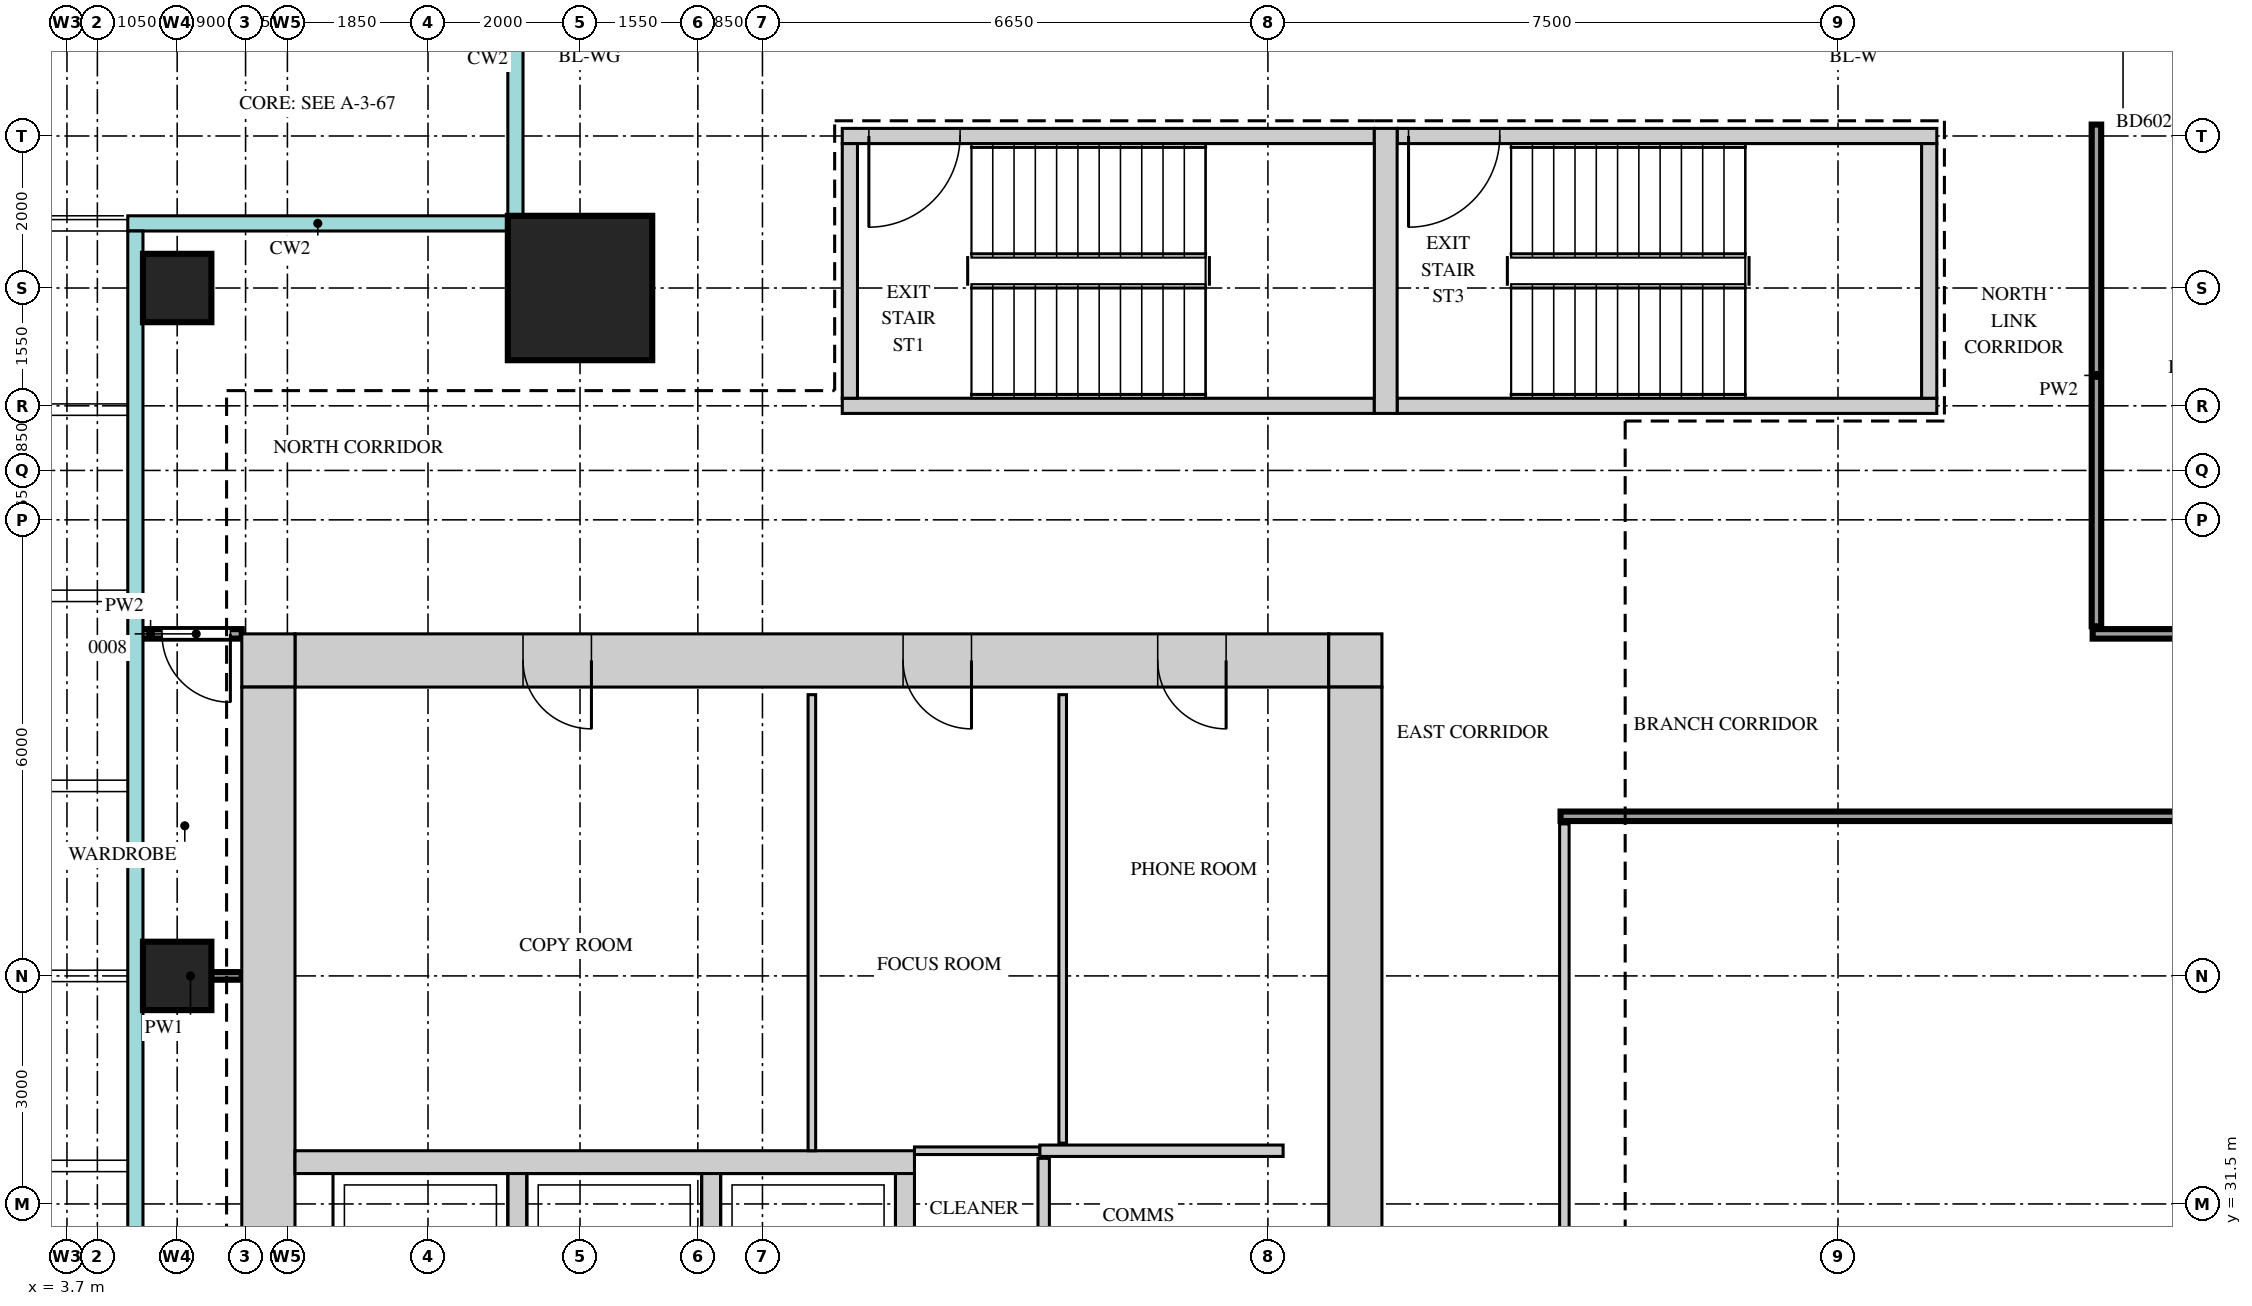
"""IFC4 building model, lengths in metres.
Left out: names, types, materials, properties, quantities, classifications, styles, units other than length and angle.
Written with IfcOpenShell. Run it as: python <this file> out.ifc"""

import sys

from ifc_helpers import new_model, si_unit, direction, frame, frame_2d, origin, origin_2d, place, context, subcontext, project, spatial, rectangle, extrude, source, transform, mapped, element, fill, save


model = new_model("IFC4")
c1 = context("Model", 3, precision=1e-05, world=origin(), true_north=direction((0.0, 1.0)))
c2 = subcontext(c1, "Body", "Model", "MODEL_VIEW")
j1 = project(units=[si_unit("LENGTHUNIT", "METRE"), si_unit("PLANEANGLEUNIT", "RADIAN")], contexts=[c1])
p1 = place(None, origin())
s1 = spatial("IfcSite", under=j1, at=p1, CompositionType="ELEMENT")
p2 = place(p1, origin())
s2 = spatial("IfcBuilding", under=s1, at=p2, CompositionType="ELEMENT")
p3 = place(p2, frame((0.0, 0.0, 266.2)))
s3 = spatial("IfcBuildingStorey", under=s2, at=p3, CompositionType="ELEMENT", Elevation=266.2)
m1 = source(origin(), c2, "Body", "SweptSolid", [
    extrude(rectangle(XDim=13.6, YDim=0.7, at=frame_2d((6.8, 0.0))), origin(), (0.0, 0.0, 1.0), 3.75),
])
p4 = place(p3, frame((6.7, 38.65, 0.0), z_axis=(0.0, 0.0, 1.0), x_axis=(1.0, 0.0, 0.0)))
e1 = element("IfcWall", 1, at=p4, inside=s3, PredefinedType="SHEAR", context=c2, shape_type="MappedRepresentation", body=[
    mapped(m1, transform((0.0, 0.0, 0.0))),
])
m2 = source(origin(), c2, "Body", "SweptSolid", [
    extrude(rectangle(XDim=0.9, YDim=2.1, at=frame_2d((0.45, 1.05))), frame((0.0, 0.36, 0.0), z_axis=(0.0, -1.0, 0.0), x_axis=(1.0, 0.0, 0.0)), (0.0, 0.0, 1.0), 0.72),
])
p5 = place(p4, frame((3.0, 0.0, 0.0)))
e2 = element("IfcOpeningElement", 2, at=p5, cuts=e1, PredefinedType="OPENING", context=c2, shape_type="MappedRepresentation", body=[
    mapped(m2, transform((0.0, 0.0, 0.0))),
])
p6 = place(p4, frame((8.0, 0.0, 0.0)))
e3 = element("IfcOpeningElement", 3, at=p6, cuts=e1, PredefinedType="OPENING", context=c2, shape_type="MappedRepresentation", body=[
    mapped(m2, transform((0.0, 0.0, 0.0))),
])
p7 = place(p4, frame((11.35, 0.0, 0.0)))
e4 = element("IfcOpeningElement", 4, at=p7, cuts=e1, PredefinedType="OPENING", context=c2, shape_type="MappedRepresentation", body=[
    mapped(m2, transform((0.0, 0.0, 0.0))),
])
m3 = source(origin(), c2, "Body", "SweptSolid", [
    extrude(rectangle(XDim=0.7, YDim=0.7, at=frame_2d((0.35, 0.0))), origin(), (0.0, 0.0, 1.0), 3.75),
])
for number, where, z_axis, x_axis in (
    (5, (20.3, 38.65, 0.0), (0.0, 0.0, 1.0), (1.0, 0.0, 0.0)),
    (6, (6.0, 38.65, 0.0), (0.0, 0.0, 1.0), (1.0, 0.0, 0.0)),
):
    element("IfcWall", number, at=place(p3, frame(where, z_axis=z_axis, x_axis=x_axis)), inside=s3, PredefinedType="SHEAR", context=c2, shape_type="MappedRepresentation", body=[
        mapped(m3, transform((0.0, 0.0, 0.0))),
    ])
m4 = source(origin(), c2, "Body", "SweptSolid", [
    extrude(rectangle(XDim=22.6, YDim=0.7, at=frame_2d((11.3, 0.0))), origin(), (0.0, 0.0, 1.0), 3.75),
])
p8 = place(p3, frame((20.65, 15.7, 0.0), z_axis=(0.0, 0.0, 1.0), x_axis=(0.0, 1.0, 0.0)))
e7 = element("IfcWall", 7, at=p8, inside=s3, PredefinedType="SHEAR", context=c2, shape_type="MappedRepresentation", body=[
    mapped(m4, transform((0.0, 0.0, 0.0))),
])
m5 = source(origin(), c2, "Body", "SweptSolid", [
    extrude(rectangle(XDim=1.8, YDim=2.1, at=frame_2d((0.9, 1.05))), frame((0.0, 0.36, 0.0), z_axis=(0.0, -1.0, 0.0), x_axis=(1.0, 0.0, 0.0)), (0.0, 0.0, 1.0), 0.72),
])
p9 = place(p8, frame((10.8, 0.0, 0.0)))
e8 = element("IfcOpeningElement", 8, at=p9, cuts=e7, PredefinedType="OPENING", context=c2, shape_type="MappedRepresentation", body=[
    mapped(m5, transform((0.0, 0.0, 0.0))),
])
p10 = place(p8, frame((0.45, 0.0, 0.0)))
e9 = element("IfcOpeningElement", 9, at=p10, cuts=e7, PredefinedType="OPENING", context=c2, shape_type="MappedRepresentation", body=[
    mapped(m2, transform((0.0, 0.0, 0.0))),
])
p11 = place(p8, frame((4.0, 0.0, 0.0)))
e10 = element("IfcOpeningElement", 10, at=p11, cuts=e7, PredefinedType="OPENING", context=c2, shape_type="MappedRepresentation", body=[
    mapped(m2, transform((0.0, 0.0, 0.0))),
])
p12 = place(p3, frame((6.35, 15.7, 0.0), z_axis=(0.0, 0.0, 1.0), x_axis=(0.0, 1.0, 0.0)))
e11 = element("IfcWall", 11, at=p12, inside=s3, PredefinedType="SHEAR", context=c2, shape_type="MappedRepresentation", body=[
    mapped(m4, transform((0.0, 0.0, 0.0))),
])
m6 = source(origin(), c2, "Body", "SweptSolid", [
    extrude(rectangle(XDim=7.0, YDim=0.2, at=frame_2d((3.5, 0.0))), origin(), (0.0, 0.0, 1.0), 3.75),
])
p13 = place(p3, frame((13.9, 45.55, 0.0), z_axis=(0.0, 0.0, 1.0), x_axis=(1.0, 0.0, 0.0)))
e12 = element("IfcWall", 12, at=p13, inside=s3, PredefinedType="SHEAR", context=c2, shape_type="MappedRepresentation", body=[
    mapped(m6, transform((0.0, 0.0, 0.0))),
])
m7 = source(origin(), c2, "Body", "SweptSolid", [
    extrude(rectangle(XDim=1.2, YDim=2.1, at=frame_2d((0.6, 1.05))), frame((0.0, 0.11, 0.0), z_axis=(0.0, -1.0, 0.0), x_axis=(1.0, 0.0, 0.0)), (0.0, 0.0, 1.0), 0.22),
])
p14 = place(p13, frame((0.35, 0.0, 0.0)))
e13 = element("IfcOpeningElement", 13, at=p14, cuts=e12, PredefinedType="OPENING", context=c2, shape_type="MappedRepresentation", body=[
    mapped(m7, transform((0.0, 0.0, 0.0))),
])
p15 = place(p3, frame((13.9, 42.0, 0.0), z_axis=(0.0, 0.0, 1.0), x_axis=(1.0, 0.0, 0.0)))
e14 = element("IfcWall", 14, at=p15, inside=s3, PredefinedType="SHEAR", context=c2, shape_type="MappedRepresentation", body=[
    mapped(m6, transform((0.0, 0.0, 0.0))),
])
m8 = source(origin(), c2, "Body", "SweptSolid", [
    extrude(rectangle(XDim=7.1, YDim=0.2, at=frame_2d((3.55, 0.0))), origin(), (0.0, 0.0, 1.0), 3.75),
])
p16 = place(p3, frame((21.2, 45.55, 0.0), z_axis=(0.0, 0.0, 1.0), x_axis=(1.0, 0.0, 0.0)))
e15 = element("IfcWall", 15, at=p16, inside=s3, PredefinedType="SHEAR", context=c2, shape_type="MappedRepresentation", body=[
    mapped(m8, transform((0.0, 0.0, 0.0))),
])
p17 = place(p16, frame((0.15, 0.0, 0.0)))
e16 = element("IfcOpeningElement", 16, at=p17, cuts=e15, PredefinedType="OPENING", context=c2, shape_type="MappedRepresentation", body=[
    mapped(m7, transform((0.0, 0.0, 0.0))),
])
p18 = place(p3, frame((21.2, 42.0, 0.0), z_axis=(0.0, 0.0, 1.0), x_axis=(1.0, 0.0, 0.0)))
e17 = element("IfcWall", 17, at=p18, inside=s3, PredefinedType="SHEAR", context=c2, shape_type="MappedRepresentation", body=[
    mapped(m8, transform((0.0, 0.0, 0.0))),
])
m9 = source(origin(), c2, "Body", "SweptSolid", [
    extrude(rectangle(XDim=3.75, YDim=0.3, at=frame_2d((1.875, 0.0))), origin(), (0.0, 0.0, 1.0), 3.75),
])
p19 = place(p3, frame((21.05, 41.9, 0.0), z_axis=(0.0, 0.0, 1.0), x_axis=(0.0, 1.0, 0.0)))
e18 = element("IfcWall", 18, at=p19, inside=s3, PredefinedType="SHEAR", context=c2, shape_type="MappedRepresentation", body=[
    mapped(m9, transform((0.0, 0.0, 0.0))),
])
m10 = source(origin(), c2, "Body", "SweptSolid", [
    extrude(rectangle(XDim=3.35, YDim=0.2, at=frame_2d((1.675, 0.0))), origin(), (0.0, 0.0, 1.0), 3.75),
])
for number, where, z_axis, x_axis in (
    (19, (14.0, 42.1, 0.0), (0.0, 0.0, 1.0), (0.0, 1.0, 0.0)),
    (20, (28.2, 42.1, 0.0), (0.0, 0.0, 1.0), (0.0, 1.0, 0.0)),
):
    element("IfcWall", number, at=place(p3, frame(where, z_axis=z_axis, x_axis=x_axis)), inside=s3, PredefinedType="SHEAR", context=c2, shape_type="MappedRepresentation", body=[
        mapped(m10, transform((0.0, 0.0, 0.0))),
    ])
m11 = source(origin(), c2, "Body", "SweptSolid", [
    extrude(rectangle(XDim=8.15, YDim=0.3, at=frame_2d((4.075, 0.0))), origin(), (0.0, 0.0, 1.0), 3.75),
])
p20 = place(p3, frame((6.7, 32.05, 0.0), z_axis=(0.0, 0.0, 1.0), x_axis=(1.0, 0.0, 0.0)))
e21 = element("IfcWall", 21, at=p20, inside=s3, PredefinedType="STANDARD", context=c2, shape_type="MappedRepresentation", body=[
    mapped(m11, transform((0.0, 0.0, 0.0))),
])
m12 = source(origin(), c2, "Body", "SweptSolid", [
    extrude(rectangle(XDim=2.4, YDim=0.25, at=frame_2d((1.2, 0.0))), origin(), (0.0, 0.0, 1.0), 3.75),
])
for number, where, z_axis, x_axis in (
    (22, (9.625, 29.5, 0.0), (0.0, 0.0, 1.0), (0.0, 1.0, 0.0)),
    (23, (12.175, 29.5, 0.0), (0.0, 0.0, 1.0), (0.0, 1.0, 0.0)),
    (24, (14.725, 29.5, 0.0), (0.0, 0.0, 1.0), (0.0, 1.0, 0.0)),
):
    element("IfcWall", number, at=place(p3, frame(where, z_axis=z_axis, x_axis=x_axis)), inside=s3, PredefinedType="STANDARD", context=c2, shape_type="MappedRepresentation", body=[
        mapped(m12, transform((0.0, 0.0, 0.0))),
    ])
m13 = source(origin(), c2, "Body", "SweptSolid", [
    extrude(rectangle(XDim=1.9, YDim=1.9, at=origin_2d()), origin(), (0.0, 0.0, 1.0), 4.0),
])
p21 = place(p3, frame((10.45, 43.55, 0.0), z_axis=(0.0, 0.0, 1.0), x_axis=(1.0, 0.0, 0.0)))
e25 = element("IfcColumn", 25, at=p21, inside=s3, PredefinedType="COLUMN", context=c2, shape_type="MappedRepresentation", body=[
    mapped(m13, transform((0.0, 0.0, 0.0))),
])
m14 = source(origin(), c2, "Body", "SweptSolid", [
    extrude(rectangle(XDim=0.9, YDim=0.9, at=origin_2d()), origin(), (0.0, 0.0, 1.0), 3.75),
])
for number, where, z_axis, x_axis in (
    (26, (5.15, 34.5, 0.0), (0.0, 0.0, 1.0), (1.0, 0.0, 0.0)),
    (27, (5.15, 43.55, 0.0), (0.0, 0.0, 1.0), (1.0, 0.0, 0.0)),
):
    element("IfcColumn", number, at=place(p3, frame(where, z_axis=z_axis, x_axis=x_axis)), inside=s3, PredefinedType="COLUMN", context=c2, shape_type="MappedRepresentation", body=[
        mapped(m14, transform((0.0, 0.0, 0.0))),
    ])
m15 = source(origin(), c2, "Body", "SweptSolid", [
    extrude(rectangle(XDim=18.4, YDim=0.125, at=frame_2d((9.2, 0.0))), origin(), (0.0, 0.0, 1.0), 3.8),
])
p22 = place(p3, frame((23.4, 18.1, 0.0), z_axis=(0.0, 0.0, 1.0), x_axis=(0.0, 1.0, 0.0)))
e28 = element("IfcWall", 28, at=p22, inside=s3, PredefinedType="PARTITIONING", context=c2, shape_type="MappedRepresentation", body=[
    mapped(m15, transform((0.0, 0.0, 0.0))),
])
m16 = source(origin(), c2, "Body", "SweptSolid", [
    extrude(rectangle(XDim=1.2, YDim=2.1, at=frame_2d((0.6, 1.05))), frame((0.0, 0.073, 0.0), z_axis=(0.0, -1.0, 0.0), x_axis=(1.0, 0.0, 0.0)), (0.0, 0.0, 1.0), 0.145),
])
p23 = place(p22, frame((8.6, 0.0, 0.0)))
e29 = element("IfcOpeningElement", 29, at=p23, cuts=e28, PredefinedType="OPENING", context=c2, shape_type="MappedRepresentation", body=[
    mapped(m16, transform((0.0, 0.0, 0.0))),
])
m17 = source(origin(), c2, "Body", "SweptSolid", [
    extrude(rectangle(XDim=2.8, YDim=0.15, at=frame_2d((1.4, 0.0))), origin(), (0.0, 0.0, 1.0), 3.8),
])
p24 = place(p3, frame((16.55, 29.3, 0.0), z_axis=(0.0, 0.0, 1.0), x_axis=(0.0, 1.0, 0.0)))
e30 = element("IfcWall", 30, at=p24, inside=s3, PredefinedType="PARTITIONING", context=c2, shape_type="MappedRepresentation", body=[
    mapped(m17, transform((0.0, 0.0, 0.0))),
])
m18 = source(origin(), c2, "Body", "SweptSolid", [
    extrude(rectangle(XDim=6.0, YDim=0.1, at=frame_2d((3.0, 0.0))), origin(), (0.0, 0.0, 1.0), 3.8),
])
p25 = place(p3, frame((13.5, 32.2, 0.0), z_axis=(0.0, 0.0, 1.0), x_axis=(0.0, 1.0, 0.0)))
e31 = element("IfcWall", 31, at=p25, inside=s3, PredefinedType="PARTITIONING", context=c2, shape_type="MappedRepresentation", body=[
    mapped(m18, transform((0.0, 0.0, 0.0))),
])
m19 = source(origin(), c2, "Body", "SweptSolid", [
    extrude(rectangle(XDim=1.65, YDim=0.1, at=frame_2d((0.825, 0.0))), origin(), (0.0, 0.0, 1.0), 3.8),
])
p26 = place(p3, frame((14.85, 32.2, 0.0), z_axis=(0.0, 0.0, 1.0), x_axis=(1.0, 0.0, 0.0)))
e32 = element("IfcWall", 32, at=p26, inside=s3, PredefinedType="PARTITIONING", context=c2, shape_type="MappedRepresentation", body=[
    mapped(m19, transform((0.0, 0.0, 0.0))),
])
m20 = source(origin(), c2, "Body", "SweptSolid", [
    extrude(rectangle(XDim=3.2, YDim=0.15, at=frame_2d((1.6, 0.0))), origin(), (0.0, 0.0, 1.0), 3.8),
])
p27 = place(p3, frame((16.5, 32.2, 0.0), z_axis=(0.0, 0.0, 1.0), x_axis=(1.0, 0.0, 0.0)))
e33 = element("IfcWall", 33, at=p27, inside=s3, PredefinedType="PARTITIONING", context=c2, shape_type="MappedRepresentation", body=[
    mapped(m20, transform((0.0, 0.0, 0.0))),
])
m21 = source(origin(), c2, "Body", "SweptSolid", [
    extrude(rectangle(XDim=5.9, YDim=0.1, at=frame_2d((2.95, 0.0))), origin(), (0.0, 0.0, 1.0), 3.8),
])
p28 = place(p3, frame((16.8, 32.3, 0.0), z_axis=(0.0, 0.0, 1.0), x_axis=(0.0, 1.0, 0.0)))
e34 = element("IfcWall", 34, at=p28, inside=s3, PredefinedType="PARTITIONING", context=c2, shape_type="MappedRepresentation", body=[
    mapped(m21, transform((0.0, 0.0, 0.0))),
])
m22 = source(origin(), c2, "Body", "SweptSolid", [
    extrude(rectangle(XDim=1.35, YDim=0.1, at=frame_2d((0.675, 0.0))), origin(), (0.0, 0.0, 1.0), 3.8),
])
p29 = place(p3, frame((4.65, 34.5, 0.0), z_axis=(0.0, 0.0, 1.0), x_axis=(1.0, 0.0, 0.0)))
e35 = element("IfcWall", 35, at=p29, inside=s3, PredefinedType="PARTITIONING", context=c2, shape_type="MappedRepresentation", body=[
    mapped(m22, transform((0.0, 0.0, 0.0))),
])
m23 = source(origin(), c2, "Body", "SweptSolid", [
    extrude(rectangle(XDim=26.0, YDim=0.125, at=frame_2d((13.0, 0.0))), origin(), (0.0, 0.0, 1.0), 3.8),
])
p30 = place(p3, frame((23.35, 36.6, 0.0), z_axis=(0.0, 0.0, 1.0), x_axis=(1.0, 0.0, 0.0)))
e36 = element("IfcWall", 36, at=p30, inside=s3, PredefinedType="PARTITIONING", context=c2, shape_type="MappedRepresentation", body=[
    mapped(m23, transform((0.0, 0.0, 0.0))),
])
m24 = source(origin(), c2, "Body", "SweptSolid", [
    extrude(rectangle(XDim=1.35, YDim=0.125, at=frame_2d((0.675, 0.0))), origin(), (0.0, 0.0, 1.0), 3.8),
])
p31 = place(p3, frame((4.65, 39.0, 0.0), z_axis=(0.0, 0.0, 1.0), x_axis=(1.0, 0.0, 0.0)))
e37 = element("IfcWall", 37, at=p31, inside=s3, PredefinedType="PARTITIONING", context=c2, shape_type="MappedRepresentation", body=[
    mapped(m24, transform((0.0, 0.0, 0.0))),
])
m25 = source(origin(), c2, "Body", "SweptSolid", [
    extrude(rectangle(XDim=0.9, YDim=2.1, at=frame_2d((0.45, 1.05))), frame((0.0, 0.073, 0.0), z_axis=(0.0, -1.0, 0.0), x_axis=(1.0, 0.0, 0.0)), (0.0, 0.0, 1.0), 0.145),
])
p32 = place(p31, frame((0.3, 0.0, 0.0)))
e38 = element("IfcOpeningElement", 38, at=p32, cuts=e37, PredefinedType="OPENING", context=c2, shape_type="MappedRepresentation", body=[
    mapped(m25, transform((0.0, 0.0, 0.0))),
])
m26 = source(origin(), c2, "Body", "SweptSolid", [
    extrude(rectangle(XDim=19.0, YDim=0.125, at=frame_2d((9.5, 0.0))), origin(), (0.0, 0.0, 1.0), 3.8),
])
p33 = place(p3, frame((30.35, 39.0, 0.0), z_axis=(0.0, 0.0, 1.0), x_axis=(1.0, 0.0, 0.0)))
e39 = element("IfcWall", 39, at=p33, inside=s3, PredefinedType="PARTITIONING", context=c2, shape_type="MappedRepresentation", body=[
    mapped(m26, transform((0.0, 0.0, 0.0))),
])
p34 = place(p33, frame((1.8, 0.0, 0.0)))
e40 = element("IfcOpeningElement", 40, at=p34, cuts=e39, PredefinedType="OPENING", context=c2, shape_type="MappedRepresentation", body=[
    mapped(m25, transform((0.0, 0.0, 0.0))),
])
p35 = place(p33, frame((8.1, 0.0, 0.0)))
e41 = element("IfcOpeningElement", 41, at=p35, cuts=e39, PredefinedType="OPENING", context=c2, shape_type="MappedRepresentation", body=[
    mapped(m25, transform((0.0, 0.0, 0.0))),
])
p36 = place(p33, frame((15.6, 0.0, 0.0)))
e42 = element("IfcOpeningElement", 42, at=p36, cuts=e39, PredefinedType="OPENING", context=c2, shape_type="MappedRepresentation", body=[
    mapped(m25, transform((0.0, 0.0, 0.0))),
])
m27 = source(origin(), c2, "Body", "SweptSolid", [
    extrude(rectangle(XDim=6.6, YDim=0.125, at=frame_2d((3.3, 0.0))), origin(), (0.0, 0.0, 1.0), 3.8),
])
p37 = place(p3, frame((30.4, 39.1, 0.0), z_axis=(0.0, 0.0, 1.0), x_axis=(0.0, 1.0, 0.0)))
e43 = element("IfcWall", 43, at=p37, inside=s3, PredefinedType="PARTITIONING", context=c2, shape_type="MappedRepresentation", body=[
    mapped(m27, transform((0.0, 0.0, 0.0))),
])
m28 = source(origin(), c2, "Body", "SweptSolid", [
    extrude(rectangle(XDim=0.9, YDim=2.1, at=frame_2d((0.45, 1.05))), frame((0.0, 0.3, 0.0), z_axis=(0.0, -1.0, 0.0), x_axis=(1.0, 0.0, 0.0)), (0.0, 0.0, 1.0), 0.6),
])
p38 = place(p5, origin())
e44 = element("IfcDoor", 44, at=p38, inside=s3, OperationType="SINGLE_SWING_RIGHT", PredefinedType="DOOR", context=c2, shape_type="MappedRepresentation", body=[
    mapped(m28, transform((0.0, 0.0, 0.0))),
])
fill(e2, e44)
p39 = place(p6, origin())
e45 = element("IfcDoor", 45, at=p39, inside=s3, OperationType="SINGLE_SWING_RIGHT", PredefinedType="DOOR", context=c2, shape_type="MappedRepresentation", body=[
    mapped(m28, transform((0.0, 0.0, 0.0))),
])
fill(e3, e45)
p40 = place(p7, origin())
e46 = element("IfcDoor", 46, at=p40, inside=s3, OperationType="SINGLE_SWING_RIGHT", PredefinedType="DOOR", context=c2, shape_type="MappedRepresentation", body=[
    mapped(m28, transform((0.0, 0.0, 0.0))),
])
fill(e4, e46)
m29 = source(origin(), c2, "Body", "SweptSolid", [
    extrude(rectangle(XDim=0.9, YDim=2.1, at=frame_2d((0.45, 1.05))), frame((0.0, 0.025, 0.0), z_axis=(0.0, -1.0, 0.0), x_axis=(1.0, 0.0, 0.0)), (0.0, 0.0, 1.0), 0.05),
])
p41 = place(p32, origin())
e47 = element("IfcDoor", 47, at=p41, inside=s3, OperationType="SINGLE_SWING_RIGHT", PredefinedType="DOOR", context=c2, shape_type="MappedRepresentation", body=[
    mapped(m29, transform((0.0, 0.0, 0.0))),
])
fill(e38, e47)
m30 = source(origin(), c2, "Body", "SweptSolid", [
    extrude(rectangle(XDim=1.2, YDim=2.1, at=frame_2d((0.6, 1.05))), frame((0.0, 0.025, 0.0), z_axis=(0.0, -1.0, 0.0), x_axis=(1.0, 0.0, 0.0)), (0.0, 0.0, 1.0), 0.05),
])
p42 = place(p14, origin())
e48 = element("IfcDoor", 48, at=p42, inside=s3, OperationType="SINGLE_SWING_LEFT", PredefinedType="DOOR", context=c2, shape_type="MappedRepresentation", body=[
    mapped(m30, transform((0.0, 0.0, 0.0))),
])
fill(e13, e48)
p43 = place(p17, origin())
e49 = element("IfcDoor", 49, at=p43, inside=s3, OperationType="SINGLE_SWING_LEFT", PredefinedType="DOOR", context=c2, shape_type="MappedRepresentation", body=[
    mapped(m30, transform((0.0, 0.0, 0.0))),
])
fill(e16, e49)
save(model, sys.argv[1])
